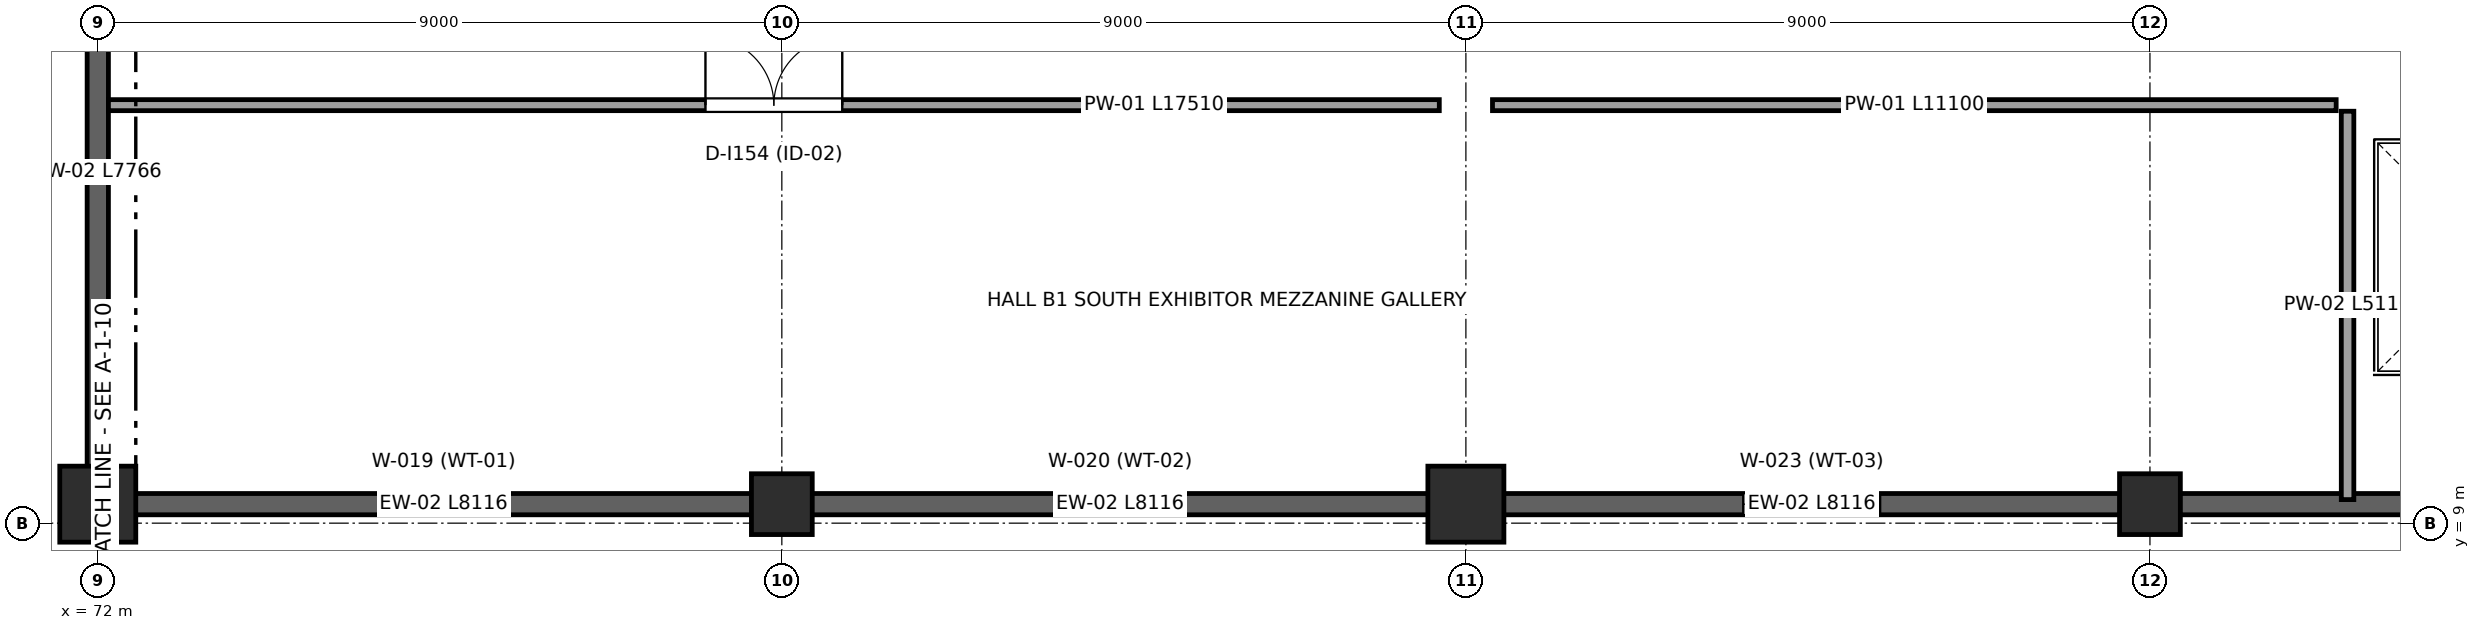
"""IFC4 building model, lengths in metres.
Left out: names, types, materials, properties, quantities, classifications, styles, units other than length and angle.
Written with IfcOpenShell. Run it as: python <this file> out.ifc"""

import sys

from ifc_helpers import new_model, si_unit, direction, frame, frame_2d, origin, origin_2d, place, context, subcontext, project, spatial, rectangle, extrude, element, fill, save


model = new_model("IFC4")
c1 = context("Model", 3, precision=1e-05, world=origin(), true_north=direction((0.0, 1.0)))
c2 = subcontext(c1, "Body", "Model", "MODEL_VIEW")
j1 = project(units=[si_unit("LENGTHUNIT", "METRE"), si_unit("PLANEANGLEUNIT", "RADIAN")], contexts=[c1])
p1 = place(None, origin())
s1 = spatial("IfcSite", under=j1, at=p1, CompositionType="ELEMENT")
p2 = place(p1, origin())
s2 = spatial("IfcBuilding", under=s1, at=p2, CompositionType="ELEMENT")
p3 = place(p2, frame((0.0, 0.0, 6.0)))
s3 = spatial("IfcBuildingStorey", under=s2, at=p3, CompositionType="ELEMENT", Elevation=6.0)
for number, where, z_axis, x_axis in (
    (1, (72.0, 9.25, 0.0), (0.0, 0.0, 1.0), (1.0, 0.0, 0.0)),
    (2, (90.0, 9.25, 0.0), (0.0, 0.0, 1.0), (1.0, 0.0, 0.0)),
):
    element("IfcColumn", number, at=place(p3, frame(where, z_axis=z_axis, x_axis=x_axis)), inside=s3, PredefinedType="COLUMN", context=c2, shape_type="SweptSolid", body=[
        extrude(rectangle(XDim=1.0, YDim=1.0, at=origin_2d()), origin(), (0.0, 0.0, 1.0), 6.0),
    ])
for number, where, z_axis, x_axis in (
    (3, (81.0, 9.25, 0.0), (0.0, 0.0, 1.0), (1.0, 0.0, 0.0)),
    (4, (99.0, 9.25, 0.0), (0.0, 0.0, 1.0), (1.0, 0.0, 0.0)),
):
    element("IfcColumn", number, at=place(p3, frame(where, z_axis=z_axis, x_axis=x_axis)), inside=s3, PredefinedType="COLUMN", context=c2, shape_type="SweptSolid", body=[
        extrude(rectangle(XDim=0.8, YDim=0.8, at=origin_2d()), origin(), (0.0, 0.0, 1.0), 6.0),
    ])
p4 = place(p3, frame((80.608, 9.25, 0.0), z_axis=(0.0, 0.0, 1.0), x_axis=(-1.0, 0.0, 0.0)))
e5 = element("IfcWall", 5, at=p4, inside=s3, PredefinedType="STANDARD", context=c2, shape_type="SweptSolid", body=[
    extrude(rectangle(XDim=8.116, YDim=0.28, at=frame_2d((4.058, 0.0))), origin(), (0.0, 0.0, 1.0), 5.7),
])
p5 = place(p4, frame((3.308, 0.0, 1.1)))
e6 = element("IfcOpeningElement", 6, at=p5, cuts=e5, PredefinedType="OPENING", context=c2, shape_type="SweptSolid", body=[
    extrude(rectangle(XDim=1.5, YDim=1.8, at=frame_2d((0.75, 0.9))), frame((0.0, 0.15, 0.0), z_axis=(0.0, -1.0, 0.0), x_axis=(1.0, 0.0, 0.0)), (0.0, 0.0, 1.0), 0.3),
])
p6 = place(p3, frame((89.508, 9.25, 0.0), z_axis=(0.0, 0.0, 1.0), x_axis=(-1.0, 0.0, 0.0)))
e7 = element("IfcWall", 7, at=p6, inside=s3, PredefinedType="STANDARD", context=c2, shape_type="SweptSolid", body=[
    extrude(rectangle(XDim=8.116, YDim=0.28, at=frame_2d((4.058, 0.0))), origin(), (0.0, 0.0, 1.0), 5.7),
])
p7 = place(p6, frame((3.233, 0.0, 1.1)))
e8 = element("IfcOpeningElement", 8, at=p7, cuts=e7, PredefinedType="OPENING", context=c2, shape_type="SweptSolid", body=[
    extrude(rectangle(XDim=1.65, YDim=1.8, at=frame_2d((0.825, 0.9))), frame((0.0, 0.15, 0.0), z_axis=(0.0, -1.0, 0.0), x_axis=(1.0, 0.0, 0.0)), (0.0, 0.0, 1.0), 0.3),
])
p8 = place(p3, frame((98.608, 9.25, 0.0), z_axis=(0.0, 0.0, 1.0), x_axis=(-1.0, 0.0, 0.0)))
e9 = element("IfcWall", 9, at=p8, inside=s3, PredefinedType="STANDARD", context=c2, shape_type="SweptSolid", body=[
    extrude(rectangle(XDim=8.116, YDim=0.28, at=frame_2d((4.058, 0.0))), origin(), (0.0, 0.0, 1.0), 5.7),
])
p9 = place(p8, frame((3.158, 0.0, 1.1)))
e10 = element("IfcOpeningElement", 10, at=p9, cuts=e9, PredefinedType="OPENING", context=c2, shape_type="SweptSolid", body=[
    extrude(rectangle(XDim=1.8, YDim=1.95, at=frame_2d((0.9, 0.975))), frame((0.0, 0.15, 0.0), z_axis=(0.0, -1.0, 0.0), x_axis=(1.0, 0.0, 0.0)), (0.0, 0.0, 1.0), 0.3),
])
p10 = place(p3, frame((107.508, 9.25, 0.0), z_axis=(0.0, 0.0, 1.0), x_axis=(-1.0, 0.0, 0.0)))
e11 = element("IfcWall", 11, at=p10, inside=s3, PredefinedType="STANDARD", context=c2, shape_type="SweptSolid", body=[
    extrude(rectangle(XDim=8.116, YDim=0.28, at=frame_2d((4.058, 0.0))), origin(), (0.0, 0.0, 1.0), 5.7),
])
p11 = place(p10, frame((3.083, 0.0, 1.1)))
e12 = element("IfcOpeningElement", 12, at=p11, cuts=e11, PredefinedType="OPENING", context=c2, shape_type="SweptSolid", body=[
    extrude(rectangle(XDim=1.95, YDim=2.1, at=frame_2d((0.975, 1.05))), frame((0.0, 0.15, 0.0), z_axis=(0.0, -1.0, 0.0), x_axis=(1.0, 0.0, 0.0)), (0.0, 0.0, 1.0), 0.3),
])
p12 = place(p3, frame((72.0, 9.742, 0.0), z_axis=(0.0, 0.0, 1.0), x_axis=(0.0, 1.0, 0.0)))
e13 = element("IfcWall", 13, at=p12, inside=s3, PredefinedType="STANDARD", context=c2, shape_type="SweptSolid", body=[
    extrude(rectangle(XDim=7.766, YDim=0.28, at=frame_2d((3.883, 0.0))), origin(), (0.0, 0.0, 1.0), 5.7),
])
p13 = place(p3, frame((72.14, 14.5, 0.0), z_axis=(0.0, 0.0, 1.0), x_axis=(1.0, 0.0, 0.0)))
e14 = element("IfcWall", 14, at=p13, inside=s3, PredefinedType="PARTITIONING", context=c2, shape_type="SweptSolid", body=[
    extrude(rectangle(XDim=17.51, YDim=0.145, at=frame_2d((8.755, 0.0))), origin(), (0.0, 0.0, 1.0), 4.55),
])
p14 = place(p13, frame((7.855, 0.0, 0.0)))
e15 = element("IfcOpeningElement", 15, at=p14, cuts=e14, PredefinedType="OPENING", context=c2, shape_type="SweptSolid", body=[
    extrude(rectangle(XDim=1.8, YDim=2.3, at=frame_2d((0.9, 1.15))), frame((0.0, 0.083, 0.0), z_axis=(0.0, -1.0, 0.0), x_axis=(1.0, 0.0, 0.0)), (0.0, 0.0, 1.0), 0.165),
])
p15 = place(p3, frame((90.35, 14.5, 0.0), z_axis=(0.0, 0.0, 1.0), x_axis=(1.0, 0.0, 0.0)))
e16 = element("IfcWall", 16, at=p15, inside=s3, PredefinedType="PARTITIONING", context=c2, shape_type="SweptSolid", body=[
    extrude(rectangle(XDim=11.1, YDim=0.145, at=frame_2d((5.55, 0.0))), origin(), (0.0, 0.0, 1.0), 4.55),
])
p16 = place(p3, frame((101.6, 9.31, 0.0), z_axis=(0.0, 0.0, 1.0), x_axis=(0.0, 1.0, 0.0)))
e17 = element("IfcWall", 17, at=p16, inside=s3, PredefinedType="PARTITIONING", context=c2, shape_type="SweptSolid", body=[
    extrude(rectangle(XDim=5.11, YDim=0.165, at=frame_2d((2.555, 0.0))), origin(), (0.0, 0.0, 1.0), 4.55),
])
p17 = place(p5, origin())
e18 = element("IfcWindow", 18, at=p17, inside=s3, PartitioningType="SINGLE_PANEL", PredefinedType="WINDOW", context=c2, shape_type="SweptSolid", body=[
    extrude(rectangle(XDim=1.5, YDim=1.8, at=frame_2d((0.75, 0.9))), frame((0.0, 0.03, 0.0), z_axis=(0.0, -1.0, 0.0), x_axis=(1.0, 0.0, 0.0)), (0.0, 0.0, 1.0), 0.06),
])
fill(e6, e18)
p18 = place(p7, origin())
e19 = element("IfcWindow", 19, at=p18, inside=s3, PartitioningType="SINGLE_PANEL", PredefinedType="WINDOW", context=c2, shape_type="SweptSolid", body=[
    extrude(rectangle(XDim=1.65, YDim=1.8, at=frame_2d((0.825, 0.9))), frame((0.0, 0.03, 0.0), z_axis=(0.0, -1.0, 0.0), x_axis=(1.0, 0.0, 0.0)), (0.0, 0.0, 1.0), 0.06),
])
fill(e8, e19)
p19 = place(p9, origin())
e20 = element("IfcWindow", 20, at=p19, inside=s3, PartitioningType="SINGLE_PANEL", PredefinedType="WINDOW", context=c2, shape_type="SweptSolid", body=[
    extrude(rectangle(XDim=1.8, YDim=1.95, at=frame_2d((0.9, 0.975))), frame((0.0, 0.03, 0.0), z_axis=(0.0, -1.0, 0.0), x_axis=(1.0, 0.0, 0.0)), (0.0, 0.0, 1.0), 0.06),
])
fill(e10, e20)
p20 = place(p14, origin())
e21 = element("IfcDoor", 21, at=p20, inside=s3, OperationType="DOUBLE_DOOR_SINGLE_SWING", PredefinedType="DOOR", context=c2, shape_type="SweptSolid", body=[
    extrude(rectangle(XDim=1.8, YDim=2.3, at=frame_2d((0.9, 1.15))), frame((0.0, 0.025, 0.0), z_axis=(0.0, -1.0, 0.0), x_axis=(1.0, 0.0, 0.0)), (0.0, 0.0, 1.0), 0.05),
])
fill(e15, e21)
save(model, sys.argv[1])
